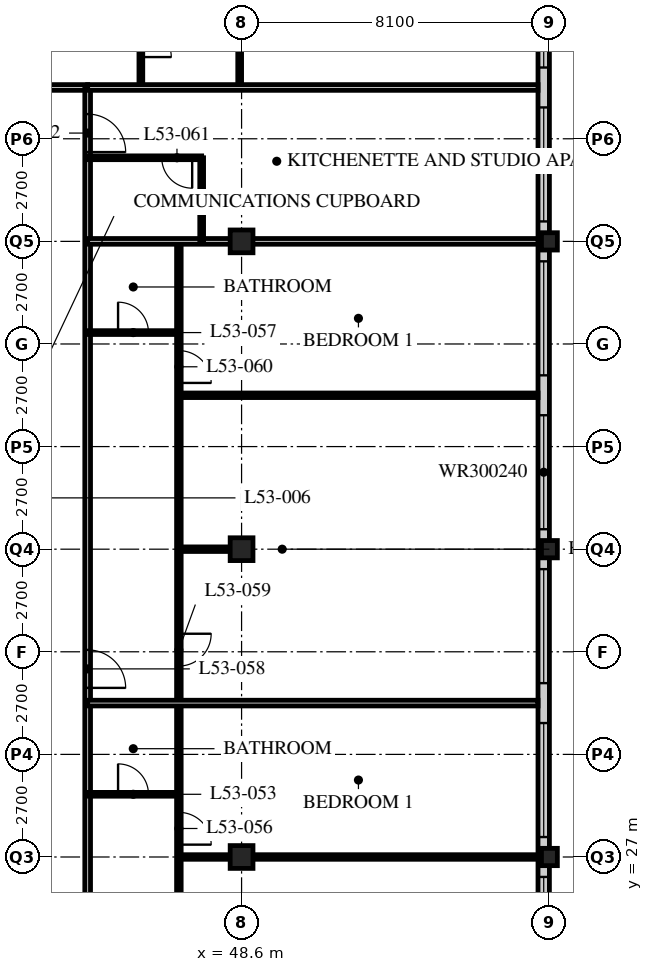
"""IFC4 building model, lengths in metres.
Left out: names, types, materials, properties, quantities, classifications, styles, units other than length and angle.
Written with IfcOpenShell. Run it as: python <this file> out.ifc"""

import sys

from ifc_helpers import new_model, si_unit, direction, frame, frame_2d, origin, origin_2d, place, context, subcontext, project, spatial, rectangle, hollow_rectangle, i_section, extrude, element, fill, save


model = new_model("IFC4")
c1 = context("Model", 3, precision=1e-05, world=origin(), true_north=direction((0.0, 1.0)))
c2 = subcontext(c1, "Body", "Model", "MODEL_VIEW")
j1 = project(units=[si_unit("LENGTHUNIT", "METRE"), si_unit("PLANEANGLEUNIT", "RADIAN")], contexts=[c1])
p1 = place(None, origin())
s1 = spatial("IfcSite", under=j1, at=p1, CompositionType="ELEMENT")
p2 = place(p1, origin())
s2 = spatial("IfcBuilding", under=s1, at=p2, CompositionType="ELEMENT")
p3 = place(p2, frame((0.0, 0.0, 206.4)))
s3 = spatial("IfcBuildingStorey", under=s2, at=p3, CompositionType="ELEMENT", Elevation=206.4)
for number, where, z_axis, x_axis in (
    (1, (48.6, 27.0, 0.0), (0.0, 0.0, 1.0), (1.0, 0.0, 0.0)),
    (2, (48.6, 35.1, 0.0), (0.0, 0.0, 1.0), (1.0, 0.0, 0.0)),
    (3, (48.6, 43.2, 0.0), (0.0, 0.0, 1.0), (1.0, 0.0, 0.0)),
):
    element("IfcColumn", number, at=place(p3, frame(where, z_axis=z_axis, x_axis=x_axis)), inside=s3, PredefinedType="COLUMN", context=c2, shape_type="SweptSolid", body=[
        extrude(hollow_rectangle(XDim=0.6, YDim=0.6, WallThickness=0.05, at=origin_2d()), origin(), (0.0, 0.0, 1.0), 3.6),
    ])
for number, where, z_axis, x_axis in (
    (4, (56.7, 27.0, 0.0), (0.0, 0.0, 1.0), (1.0, 0.0, 0.0)),
    (5, (56.7, 35.1, 0.0), (0.0, 0.0, 1.0), (1.0, 0.0, 0.0)),
    (6, (56.7, 43.2, 0.0), (0.0, 0.0, 1.0), (1.0, 0.0, 0.0)),
):
    element("IfcColumn", number, at=place(p3, frame(where, z_axis=z_axis, x_axis=x_axis)), inside=s3, PredefinedType="COLUMN", context=c2, shape_type="SweptSolid", body=[
        extrude(i_section(OverallWidth=0.418, OverallDepth=0.456, WebThickness=0.042, FlangeThickness=0.067, FilletRadius=0.015, at=origin_2d()), origin(), (0.0, 0.0, 1.0), 3.6),
    ])
p4 = place(p3, frame((56.55, 19.2, 0.0), z_axis=(0.0, 0.0, 1.0), x_axis=(0.0, 1.0, 0.0)))
e7 = element("IfcWall", 7, at=p4, inside=s3, PredefinedType="SOLIDWALL", context=c2, shape_type="SweptSolid", body=[
    extrude(rectangle(XDim=32.1, YDim=0.3, at=frame_2d((16.05, 0.0))), origin(), (0.0, 0.0, 1.0), 3.39),
])
p5 = place(p4, frame((0.225, 0.0, 0.6)))
e8 = element("IfcOpeningElement", 8, at=p5, cuts=e7, PredefinedType="OPENING", context=c2, shape_type="SweptSolid", body=[
    extrude(rectangle(XDim=3.0, YDim=2.4, at=frame_2d((1.5, 1.2))), frame((0.0, 0.16, 0.0), z_axis=(0.0, -1.0, 0.0), x_axis=(1.0, 0.0, 0.0)), (0.0, 0.0, 1.0), 0.32),
])
p6 = place(p4, frame((4.275, 0.0, 0.6)))
e9 = element("IfcOpeningElement", 9, at=p6, cuts=e7, PredefinedType="OPENING", context=c2, shape_type="SweptSolid", body=[
    extrude(rectangle(XDim=3.0, YDim=2.4, at=frame_2d((1.5, 1.2))), frame((0.0, 0.16, 0.0), z_axis=(0.0, -1.0, 0.0), x_axis=(1.0, 0.0, 0.0)), (0.0, 0.0, 1.0), 0.32),
])
p7 = place(p4, frame((8.325, 0.0, 0.6)))
e10 = element("IfcOpeningElement", 10, at=p7, cuts=e7, PredefinedType="OPENING", context=c2, shape_type="SweptSolid", body=[
    extrude(rectangle(XDim=3.0, YDim=2.4, at=frame_2d((1.5, 1.2))), frame((0.0, 0.16, 0.0), z_axis=(0.0, -1.0, 0.0), x_axis=(1.0, 0.0, 0.0)), (0.0, 0.0, 1.0), 0.32),
])
p8 = place(p4, frame((12.375, 0.0, 0.6)))
e11 = element("IfcOpeningElement", 11, at=p8, cuts=e7, PredefinedType="OPENING", context=c2, shape_type="SweptSolid", body=[
    extrude(rectangle(XDim=3.0, YDim=2.4, at=frame_2d((1.5, 1.2))), frame((0.0, 0.16, 0.0), z_axis=(0.0, -1.0, 0.0), x_axis=(1.0, 0.0, 0.0)), (0.0, 0.0, 1.0), 0.32),
])
p9 = place(p4, frame((16.425, 0.0, 0.6)))
e12 = element("IfcOpeningElement", 12, at=p9, cuts=e7, PredefinedType="OPENING", context=c2, shape_type="SweptSolid", body=[
    extrude(rectangle(XDim=3.0, YDim=2.4, at=frame_2d((1.5, 1.2))), frame((0.0, 0.16, 0.0), z_axis=(0.0, -1.0, 0.0), x_axis=(1.0, 0.0, 0.0)), (0.0, 0.0, 1.0), 0.32),
])
p10 = place(p4, frame((20.475, 0.0, 0.6)))
e13 = element("IfcOpeningElement", 13, at=p10, cuts=e7, PredefinedType="OPENING", context=c2, shape_type="SweptSolid", body=[
    extrude(rectangle(XDim=3.0, YDim=2.4, at=frame_2d((1.5, 1.2))), frame((0.0, 0.16, 0.0), z_axis=(0.0, -1.0, 0.0), x_axis=(1.0, 0.0, 0.0)), (0.0, 0.0, 1.0), 0.32),
])
p11 = place(p4, frame((24.525, 0.0, 0.6)))
e14 = element("IfcOpeningElement", 14, at=p11, cuts=e7, PredefinedType="OPENING", context=c2, shape_type="SweptSolid", body=[
    extrude(rectangle(XDim=3.0, YDim=2.4, at=frame_2d((1.5, 1.2))), frame((0.0, 0.16, 0.0), z_axis=(0.0, -1.0, 0.0), x_axis=(1.0, 0.0, 0.0)), (0.0, 0.0, 1.0), 0.32),
])
p12 = place(p4, frame((28.575, 0.0, 0.6)))
e15 = element("IfcOpeningElement", 15, at=p12, cuts=e7, PredefinedType="OPENING", context=c2, shape_type="SweptSolid", body=[
    extrude(rectangle(XDim=3.0, YDim=2.4, at=frame_2d((1.5, 1.2))), frame((0.0, 0.16, 0.0), z_axis=(0.0, -1.0, 0.0), x_axis=(1.0, 0.0, 0.0)), (0.0, 0.0, 1.0), 0.32),
])
p13 = place(p3, frame((8.1, 47.25, 0.0), z_axis=(0.0, 0.0, 1.0), x_axis=(1.0, 0.0, 0.0)))
e16 = element("IfcWall", 16, at=p13, inside=s3, PredefinedType="PARTITIONING", context=c2, shape_type="SweptSolid", body=[
    extrude(rectangle(XDim=36.45, YDim=0.15, at=frame_2d((18.225, 0.0))), origin(), (0.0, 0.0, 1.0), 3.39),
])
p14 = place(p13, frame((4.45, 0.0, 0.0)))
e17 = element("IfcOpeningElement", 17, at=p14, cuts=e16, PredefinedType="OPENING", context=c2, shape_type="SweptSolid", body=[
    extrude(rectangle(XDim=1.0, YDim=2.1, at=frame_2d((0.5, 1.05))), frame((0.0, 0.085, 0.0), z_axis=(0.0, -1.0, 0.0), x_axis=(1.0, 0.0, 0.0)), (0.0, 0.0, 1.0), 0.17),
])
p15 = place(p13, frame((12.55, 0.0, 0.0)))
e18 = element("IfcOpeningElement", 18, at=p15, cuts=e16, PredefinedType="OPENING", context=c2, shape_type="SweptSolid", body=[
    extrude(rectangle(XDim=1.0, YDim=2.1, at=frame_2d((0.5, 1.05))), frame((0.0, 0.085, 0.0), z_axis=(0.0, -1.0, 0.0), x_axis=(1.0, 0.0, 0.0)), (0.0, 0.0, 1.0), 0.17),
])
p16 = place(p13, frame((30.7, 0.0, 0.0)))
e19 = element("IfcOpeningElement", 19, at=p16, cuts=e16, PredefinedType="OPENING", context=c2, shape_type="SweptSolid", body=[
    extrude(rectangle(XDim=1.0, YDim=2.1, at=frame_2d((0.5, 1.05))), frame((0.0, 0.085, 0.0), z_axis=(0.0, -1.0, 0.0), x_axis=(1.0, 0.0, 0.0)), (0.0, 0.0, 1.0), 0.17),
])
p17 = place(p13, frame((33.925, 0.0, 0.0)))
e20 = element("IfcOpeningElement", 20, at=p17, cuts=e16, PredefinedType="OPENING", context=c2, shape_type="SweptSolid", body=[
    extrude(rectangle(XDim=1.0, YDim=2.1, at=frame_2d((0.5, 1.05))), frame((0.0, 0.085, 0.0), z_axis=(0.0, -1.0, 0.0), x_axis=(1.0, 0.0, 0.0)), (0.0, 0.0, 1.0), 0.17),
])
p18 = place(p13, frame((1.525, 0.0, 0.0)))
e21 = element("IfcOpeningElement", 21, at=p18, cuts=e16, PredefinedType="OPENING", context=c2, shape_type="SweptSolid", body=[
    extrude(rectangle(XDim=1.0, YDim=2.1, at=frame_2d((0.5, 1.05))), frame((0.0, 0.085, 0.0), z_axis=(0.0, -1.0, 0.0), x_axis=(1.0, 0.0, 0.0)), (0.0, 0.0, 1.0), 0.17),
])
p19 = place(p3, frame((44.55, 18.9, 0.0), z_axis=(0.0, 0.0, 1.0), x_axis=(0.0, 1.0, 0.0)))
e22 = element("IfcWall", 22, at=p19, inside=s3, PredefinedType="PARTITIONING", context=c2, shape_type="SweptSolid", body=[
    extrude(rectangle(XDim=28.35, YDim=0.15, at=frame_2d((14.175, 0.0))), origin(), (0.0, 0.0, 1.0), 3.39),
])
p20 = place(p19, frame((0.4, 0.0, 0.0)))
e23 = element("IfcOpeningElement", 23, at=p20, cuts=e22, PredefinedType="OPENING", context=c2, shape_type="SweptSolid", body=[
    extrude(rectangle(XDim=1.0, YDim=2.1, at=frame_2d((0.5, 1.05))), frame((0.0, 0.085, 0.0), z_axis=(0.0, -1.0, 0.0), x_axis=(1.0, 0.0, 0.0)), (0.0, 0.0, 1.0), 0.17),
])
p21 = place(p19, frame((12.55, 0.0, 0.0)))
e24 = element("IfcOpeningElement", 24, at=p21, cuts=e22, PredefinedType="OPENING", context=c2, shape_type="SweptSolid", body=[
    extrude(rectangle(XDim=1.0, YDim=2.1, at=frame_2d((0.5, 1.05))), frame((0.0, 0.085, 0.0), z_axis=(0.0, -1.0, 0.0), x_axis=(1.0, 0.0, 0.0)), (0.0, 0.0, 1.0), 0.17),
])
p22 = place(p19, frame((26.65, 0.0, 0.0)))
e25 = element("IfcOpeningElement", 25, at=p22, cuts=e22, PredefinedType="OPENING", context=c2, shape_type="SweptSolid", body=[
    extrude(rectangle(XDim=1.0, YDim=2.1, at=frame_2d((0.5, 1.05))), frame((0.0, 0.085, 0.0), z_axis=(0.0, -1.0, 0.0), x_axis=(1.0, 0.0, 0.0)), (0.0, 0.0, 1.0), 0.17),
])
p23 = place(p3, frame((46.95, 18.9, 0.0), z_axis=(0.0, 0.0, 1.0), x_axis=(0.0, 1.0, 0.0)))
e26 = element("IfcWall", 26, at=p23, inside=s3, PredefinedType="PARTITIONING", context=c2, shape_type="SweptSolid", body=[
    extrude(rectangle(XDim=24.3, YDim=0.12, at=frame_2d((12.15, 0.0))), origin(), (0.0, 0.0, 1.0), 3.39),
])
p24 = place(p23, frame((0.975, 0.0, 0.0)))
e27 = element("IfcOpeningElement", 27, at=p24, cuts=e26, PredefinedType="OPENING", context=c2, shape_type="SweptSolid", body=[
    extrude(rectangle(XDim=0.85, YDim=2.1, at=frame_2d((0.425, 1.05))), frame((0.0, 0.07, 0.0), z_axis=(0.0, -1.0, 0.0), x_axis=(1.0, 0.0, 0.0)), (0.0, 0.0, 1.0), 0.14),
])
p25 = place(p23, frame((8.425, 0.0, 0.0)))
e28 = element("IfcOpeningElement", 28, at=p25, cuts=e26, PredefinedType="OPENING", context=c2, shape_type="SweptSolid", body=[
    extrude(rectangle(XDim=0.85, YDim=2.1, at=frame_2d((0.425, 1.05))), frame((0.0, 0.07, 0.0), z_axis=(0.0, -1.0, 0.0), x_axis=(1.0, 0.0, 0.0)), (0.0, 0.0, 1.0), 0.14),
])
p26 = place(p23, frame((13.125, 0.0, 0.0)))
e29 = element("IfcOpeningElement", 29, at=p26, cuts=e26, PredefinedType="OPENING", context=c2, shape_type="SweptSolid", body=[
    extrude(rectangle(XDim=0.85, YDim=2.1, at=frame_2d((0.425, 1.05))), frame((0.0, 0.07, 0.0), z_axis=(0.0, -1.0, 0.0), x_axis=(1.0, 0.0, 0.0)), (0.0, 0.0, 1.0), 0.14),
])
p27 = place(p23, frame((20.575, 0.0, 0.0)))
e30 = element("IfcOpeningElement", 30, at=p27, cuts=e26, PredefinedType="OPENING", context=c2, shape_type="SweptSolid", body=[
    extrude(rectangle(XDim=0.85, YDim=2.1, at=frame_2d((0.425, 1.05))), frame((0.0, 0.07, 0.0), z_axis=(0.0, -1.0, 0.0), x_axis=(1.0, 0.0, 0.0)), (0.0, 0.0, 1.0), 0.14),
])
p28 = place(p3, frame((44.55, 28.65, 0.0), z_axis=(0.0, 0.0, 1.0), x_axis=(1.0, 0.0, 0.0)))
e31 = element("IfcWall", 31, at=p28, inside=s3, PredefinedType="PARTITIONING", context=c2, shape_type="SweptSolid", body=[
    extrude(rectangle(XDim=2.4, YDim=0.1, at=frame_2d((1.2, 0.0))), origin(), (0.0, 0.0, 1.0), 3.39),
])
p29 = place(p28, frame((0.8, 0.0, 0.0)))
e32 = element("IfcOpeningElement", 32, at=p29, cuts=e31, PredefinedType="OPENING", context=c2, shape_type="SweptSolid", body=[
    extrude(rectangle(XDim=0.8, YDim=2.1, at=frame_2d((0.4, 1.05))), frame((0.0, 0.06, 0.0), z_axis=(0.0, -1.0, 0.0), x_axis=(1.0, 0.0, 0.0)), (0.0, 0.0, 1.0), 0.12),
])
p30 = place(p3, frame((46.95, 27.0, 0.0), z_axis=(0.0, 0.0, 1.0), x_axis=(1.0, 0.0, 0.0)))
e33 = element("IfcWall", 33, at=p30, inside=s3, PredefinedType="PARTITIONING", context=c2, shape_type="SweptSolid", body=[
    extrude(rectangle(XDim=9.45, YDim=0.12, at=frame_2d((4.725, 0.0))), origin(), (0.0, 0.0, 1.0), 2.778),
])
p31 = place(p3, frame((44.55, 31.05, 0.0), z_axis=(0.0, 0.0, 1.0), x_axis=(1.0, 0.0, 0.0)))
e34 = element("IfcWall", 34, at=p31, inside=s3, PredefinedType="PARTITIONING", context=c2, shape_type="SweptSolid", body=[
    extrude(rectangle(XDim=11.85, YDim=0.15, at=frame_2d((5.925, 0.0))), origin(), (0.0, 0.0, 1.0), 3.39),
])
p32 = place(p3, frame((44.55, 40.8, 0.0), z_axis=(0.0, 0.0, 1.0), x_axis=(1.0, 0.0, 0.0)))
e35 = element("IfcWall", 35, at=p32, inside=s3, PredefinedType="PARTITIONING", context=c2, shape_type="SweptSolid", body=[
    extrude(rectangle(XDim=2.4, YDim=0.1, at=frame_2d((1.2, 0.0))), origin(), (0.0, 0.0, 1.0), 3.39),
])
p33 = place(p32, frame((0.8, 0.0, 0.0)))
e36 = element("IfcOpeningElement", 36, at=p33, cuts=e35, PredefinedType="OPENING", context=c2, shape_type="SweptSolid", body=[
    extrude(rectangle(XDim=0.8, YDim=2.1, at=frame_2d((0.4, 1.05))), frame((0.0, 0.06, 0.0), z_axis=(0.0, -1.0, 0.0), x_axis=(1.0, 0.0, 0.0)), (0.0, 0.0, 1.0), 0.12),
])
p34 = place(p3, frame((46.95, 39.15, 0.0), z_axis=(0.0, 0.0, 1.0), x_axis=(1.0, 0.0, 0.0)))
e37 = element("IfcWall", 37, at=p34, inside=s3, PredefinedType="PARTITIONING", context=c2, shape_type="SweptSolid", body=[
    extrude(rectangle(XDim=9.45, YDim=0.12, at=frame_2d((4.725, 0.0))), origin(), (0.0, 0.0, 1.0), 3.39),
])
p35 = place(p3, frame((44.55, 43.2, 0.0), z_axis=(0.0, 0.0, 1.0), x_axis=(1.0, 0.0, 0.0)))
e38 = element("IfcWall", 38, at=p35, inside=s3, PredefinedType="PARTITIONING", context=c2, shape_type="SweptSolid", body=[
    extrude(rectangle(XDim=11.85, YDim=0.15, at=frame_2d((5.925, 0.0))), origin(), (0.0, 0.0, 1.0), 2.778),
])
p36 = place(p3, frame((47.55, 43.2, 0.0), z_axis=(0.0, 0.0, 1.0), x_axis=(0.0, 1.0, 0.0)))
e39 = element("IfcWall", 39, at=p36, inside=s3, PredefinedType="PARTITIONING", context=c2, shape_type="SweptSolid", body=[
    extrude(rectangle(XDim=2.2, YDim=0.1, at=frame_2d((1.1, 0.0))), origin(), (0.0, 0.0, 1.0), 3.39),
])
p37 = place(p3, frame((44.55, 45.4, 0.0), z_axis=(0.0, 0.0, 1.0), x_axis=(1.0, 0.0, 0.0)))
e40 = element("IfcWall", 40, at=p37, inside=s3, PredefinedType="PARTITIONING", context=c2, shape_type="SweptSolid", body=[
    extrude(rectangle(XDim=3.0, YDim=0.1, at=frame_2d((1.5, 0.0))), origin(), (0.0, 0.0, 1.0), 3.39),
])
p38 = place(p37, frame((1.95, 0.0, 0.0)))
e41 = element("IfcOpeningElement", 41, at=p38, cuts=e40, PredefinedType="OPENING", context=c2, shape_type="SweptSolid", body=[
    extrude(rectangle(XDim=0.8, YDim=2.1, at=frame_2d((0.4, 1.05))), frame((0.0, 0.06, 0.0), z_axis=(0.0, -1.0, 0.0), x_axis=(1.0, 0.0, 0.0)), (0.0, 0.0, 1.0), 0.12),
])
p39 = place(p3, frame((45.95, 47.25, 0.0), z_axis=(0.0, 0.0, 1.0), x_axis=(0.0, 1.0, 0.0)))
e42 = element("IfcWall", 42, at=p39, inside=s3, PredefinedType="PARTITIONING", context=c2, shape_type="SweptSolid", body=[
    extrude(rectangle(XDim=2.4, YDim=0.1, at=frame_2d((1.2, 0.0))), origin(), (0.0, 0.0, 1.0), 3.39),
])
p40 = place(p39, frame((0.8, 0.0, 0.0)))
e43 = element("IfcOpeningElement", 43, at=p40, cuts=e42, PredefinedType="OPENING", context=c2, shape_type="SweptSolid", body=[
    extrude(rectangle(XDim=0.8, YDim=2.1, at=frame_2d((0.4, 1.05))), frame((0.0, 0.06, 0.0), z_axis=(0.0, -1.0, 0.0), x_axis=(1.0, 0.0, 0.0)), (0.0, 0.0, 1.0), 0.12),
])
p41 = place(p3, frame((48.55, 47.25, 0.0), z_axis=(0.0, 0.0, 1.0), x_axis=(0.0, 1.0, 0.0)))
e44 = element("IfcWall", 44, at=p41, inside=s3, PredefinedType="PARTITIONING", context=c2, shape_type="SweptSolid", body=[
    extrude(rectangle(XDim=2.4, YDim=0.1, at=frame_2d((1.2, 0.0))), origin(), (0.0, 0.0, 1.0), 2.778),
])
p42 = place(p3, frame((44.55, 47.25, 0.0), z_axis=(0.0, 0.0, 1.0), x_axis=(1.0, 0.0, 0.0)))
e45 = element("IfcWall", 45, at=p42, inside=s3, PredefinedType="PARTITIONING", context=c2, shape_type="SweptSolid", body=[
    extrude(rectangle(XDim=11.85, YDim=0.15, at=frame_2d((5.925, 0.0))), origin(), (0.0, 0.0, 1.0), 3.39),
])
p43 = place(p3, frame((46.95, 35.1, 0.0), z_axis=(0.0, 0.0, 1.0), x_axis=(1.0, 0.0, 0.0)))
e46 = element("IfcWall", 46, at=p43, inside=s3, PredefinedType="PARTITIONING", context=c2, shape_type="SweptSolid", body=[
    extrude(rectangle(XDim=1.35, YDim=0.12, at=frame_2d((0.675, 0.0))), origin(), (0.0, 0.0, 1.0), 2.778),
])
p44 = place(p6, origin())
e47 = element("IfcWindow", 47, at=p44, inside=s3, PartitioningType="SINGLE_PANEL", PredefinedType="WINDOW", context=c2, shape_type="SweptSolid", body=[
    extrude(rectangle(XDim=3.0, YDim=2.4, at=frame_2d((1.5, 1.2))), frame((0.0, 0.03, 0.0), z_axis=(0.0, -1.0, 0.0), x_axis=(1.0, 0.0, 0.0)), (0.0, 0.0, 1.0), 0.06),
])
fill(e9, e47)
p45 = place(p7, origin())
e48 = element("IfcWindow", 48, at=p45, inside=s3, PartitioningType="SINGLE_PANEL", PredefinedType="WINDOW", context=c2, shape_type="SweptSolid", body=[
    extrude(rectangle(XDim=3.0, YDim=2.4, at=frame_2d((1.5, 1.2))), frame((0.0, 0.03, 0.0), z_axis=(0.0, -1.0, 0.0), x_axis=(1.0, 0.0, 0.0)), (0.0, 0.0, 1.0), 0.06),
])
fill(e10, e48)
p46 = place(p8, origin())
e49 = element("IfcWindow", 49, at=p46, inside=s3, PartitioningType="SINGLE_PANEL", PredefinedType="WINDOW", context=c2, shape_type="SweptSolid", body=[
    extrude(rectangle(XDim=3.0, YDim=2.4, at=frame_2d((1.5, 1.2))), frame((0.0, 0.03, 0.0), z_axis=(0.0, -1.0, 0.0), x_axis=(1.0, 0.0, 0.0)), (0.0, 0.0, 1.0), 0.06),
])
fill(e11, e49)
p47 = place(p9, origin())
e50 = element("IfcWindow", 50, at=p47, inside=s3, PartitioningType="SINGLE_PANEL", PredefinedType="WINDOW", context=c2, shape_type="SweptSolid", body=[
    extrude(rectangle(XDim=3.0, YDim=2.4, at=frame_2d((1.5, 1.2))), frame((0.0, 0.03, 0.0), z_axis=(0.0, -1.0, 0.0), x_axis=(1.0, 0.0, 0.0)), (0.0, 0.0, 1.0), 0.06),
])
fill(e12, e50)
p48 = place(p10, origin())
e51 = element("IfcWindow", 51, at=p48, inside=s3, PartitioningType="SINGLE_PANEL", PredefinedType="WINDOW", context=c2, shape_type="SweptSolid", body=[
    extrude(rectangle(XDim=3.0, YDim=2.4, at=frame_2d((1.5, 1.2))), frame((0.0, 0.03, 0.0), z_axis=(0.0, -1.0, 0.0), x_axis=(1.0, 0.0, 0.0)), (0.0, 0.0, 1.0), 0.06),
])
fill(e13, e51)
p49 = place(p11, origin())
e52 = element("IfcWindow", 52, at=p49, inside=s3, PartitioningType="SINGLE_PANEL", PredefinedType="WINDOW", context=c2, shape_type="SweptSolid", body=[
    extrude(rectangle(XDim=3.0, YDim=2.4, at=frame_2d((1.5, 1.2))), frame((0.0, 0.03, 0.0), z_axis=(0.0, -1.0, 0.0), x_axis=(1.0, 0.0, 0.0)), (0.0, 0.0, 1.0), 0.06),
])
fill(e14, e52)
p50 = place(p12, origin())
e53 = element("IfcWindow", 53, at=p50, inside=s3, PartitioningType="SINGLE_PANEL", PredefinedType="WINDOW", context=c2, shape_type="SweptSolid", body=[
    extrude(rectangle(XDim=3.0, YDim=2.4, at=frame_2d((1.5, 1.2))), frame((0.0, 0.03, 0.0), z_axis=(0.0, -1.0, 0.0), x_axis=(1.0, 0.0, 0.0)), (0.0, 0.0, 1.0), 0.06),
])
fill(e15, e53)
p51 = place(p29, origin())
e54 = element("IfcDoor", 54, at=p51, inside=s3, OperationType="SINGLE_SWING_LEFT", PredefinedType="DOOR", context=c2, shape_type="SweptSolid", body=[
    extrude(rectangle(XDim=0.8, YDim=2.1, at=frame_2d((0.4, 1.05))), frame((0.0, 0.025, 0.0), z_axis=(0.0, -1.0, 0.0), x_axis=(1.0, 0.0, 0.0)), (0.0, 0.0, 1.0), 0.05),
])
fill(e32, e54)
p52 = place(p25, origin())
e55 = element("IfcDoor", 55, at=p52, inside=s3, OperationType="SINGLE_SWING_RIGHT", PredefinedType="DOOR", context=c2, shape_type="SweptSolid", body=[
    extrude(rectangle(XDim=0.85, YDim=2.1, at=frame_2d((0.425, 1.05))), frame((0.0, 0.025, 0.0), z_axis=(0.0, -1.0, 0.0), x_axis=(1.0, 0.0, 0.0)), (0.0, 0.0, 1.0), 0.05),
])
fill(e28, e55)
p53 = place(p33, origin())
e56 = element("IfcDoor", 56, at=p53, inside=s3, OperationType="SINGLE_SWING_LEFT", PredefinedType="DOOR", context=c2, shape_type="SweptSolid", body=[
    extrude(rectangle(XDim=0.8, YDim=2.1, at=frame_2d((0.4, 1.05))), frame((0.0, 0.025, 0.0), z_axis=(0.0, -1.0, 0.0), x_axis=(1.0, 0.0, 0.0)), (0.0, 0.0, 1.0), 0.05),
])
fill(e36, e56)
p54 = place(p21, origin())
e57 = element("IfcDoor", 57, at=p54, inside=s3, OperationType="SINGLE_SWING_RIGHT", PredefinedType="DOOR", context=c2, shape_type="SweptSolid", body=[
    extrude(rectangle(XDim=1.0, YDim=2.1, at=frame_2d((0.5, 1.05))), frame((0.0, 0.025, 0.0), z_axis=(0.0, -1.0, 0.0), x_axis=(1.0, 0.0, 0.0)), (0.0, 0.0, 1.0), 0.05),
])
fill(e24, e57)
p55 = place(p26, origin())
e58 = element("IfcDoor", 58, at=p55, inside=s3, OperationType="SINGLE_SWING_LEFT", PredefinedType="DOOR", context=c2, shape_type="SweptSolid", body=[
    extrude(rectangle(XDim=0.85, YDim=2.1, at=frame_2d((0.425, 1.05))), frame((0.0, 0.025, 0.0), z_axis=(0.0, -1.0, 0.0), x_axis=(1.0, 0.0, 0.0)), (0.0, 0.0, 1.0), 0.05),
])
fill(e29, e58)
p56 = place(p27, origin())
e59 = element("IfcDoor", 59, at=p56, inside=s3, OperationType="SINGLE_SWING_RIGHT", PredefinedType="DOOR", context=c2, shape_type="SweptSolid", body=[
    extrude(rectangle(XDim=0.85, YDim=2.1, at=frame_2d((0.425, 1.05))), frame((0.0, 0.025, 0.0), z_axis=(0.0, -1.0, 0.0), x_axis=(1.0, 0.0, 0.0)), (0.0, 0.0, 1.0), 0.05),
])
fill(e30, e59)
p57 = place(p38, origin())
e60 = element("IfcDoor", 60, at=p57, inside=s3, OperationType="SINGLE_SWING_LEFT", PredefinedType="DOOR", context=c2, shape_type="SweptSolid", body=[
    extrude(rectangle(XDim=0.8, YDim=2.1, at=frame_2d((0.4, 1.05))), frame((0.0, 0.025, 0.0), z_axis=(0.0, -1.0, 0.0), x_axis=(1.0, 0.0, 0.0)), (0.0, 0.0, 1.0), 0.05),
])
fill(e41, e60)
p58 = place(p22, origin())
e61 = element("IfcDoor", 61, at=p58, inside=s3, OperationType="SINGLE_SWING_RIGHT", PredefinedType="DOOR", context=c2, shape_type="SweptSolid", body=[
    extrude(rectangle(XDim=1.0, YDim=2.1, at=frame_2d((0.5, 1.05))), frame((0.0, 0.025, 0.0), z_axis=(0.0, -1.0, 0.0), x_axis=(1.0, 0.0, 0.0)), (0.0, 0.0, 1.0), 0.05),
])
fill(e25, e61)
p59 = place(p40, origin())
e62 = element("IfcDoor", 62, at=p59, inside=s3, OperationType="SINGLE_SWING_RIGHT", PredefinedType="DOOR", context=c2, shape_type="SweptSolid", body=[
    extrude(rectangle(XDim=0.8, YDim=2.1, at=frame_2d((0.4, 1.05))), frame((0.0, 0.025, 0.0), z_axis=(0.0, -1.0, 0.0), x_axis=(1.0, 0.0, 0.0)), (0.0, 0.0, 1.0), 0.05),
])
fill(e43, e62)
save(model, sys.argv[1])
